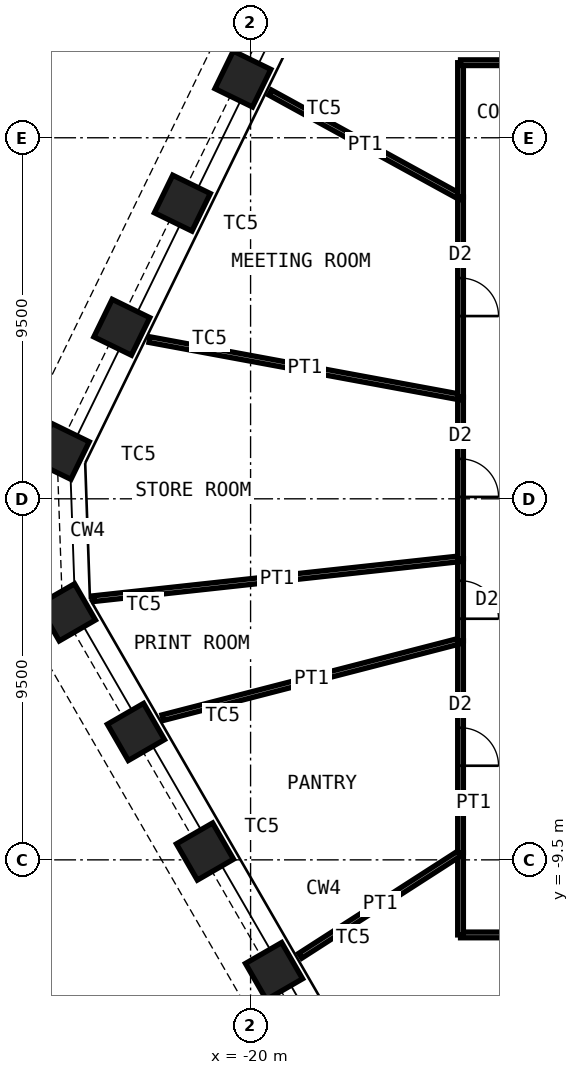
"""IFC4 building model, lengths in metres.
Left out: names, types, materials, properties, quantities, classifications, styles, units other than length and angle.
Written with IfcOpenShell. Run it as: python <this file> out.ifc"""

import sys

from ifc_helpers import new_model, si_unit, direction, frame, frame_2d, origin, origin_2d, place, context, subcontext, project, spatial, rectangle, hollow_rectangle, extrude, element, fill, save


model = new_model("IFC4")
c1 = context("Model", 3, precision=1e-05, world=origin(), true_north=direction((0.0, 1.0)))
c2 = subcontext(c1, "Body", "Model", "MODEL_VIEW")
j1 = project(units=[si_unit("LENGTHUNIT", "METRE"), si_unit("PLANEANGLEUNIT", "RADIAN")], contexts=[c1])
p1 = place(None, origin())
s1 = spatial("IfcSite", under=j1, at=p1, CompositionType="ELEMENT")
p2 = place(p1, origin())
s2 = spatial("IfcBuilding", under=s1, at=p2, CompositionType="ELEMENT")
p3 = place(p2, frame((0.0, 0.0, 218.2)))
s3 = spatial("IfcBuildingStorey", under=s2, at=p3, CompositionType="ELEMENT", Elevation=218.2)
for number, where, z_axis, x_axis in (
    (1, (-19.383, -12.428, 0.0), (0.0, 0.0, 1.0), (0.5, -0.866, 0.0)),
    (2, (-21.2, -9.281, 0.0), (0.0, 0.0, 1.0), (0.5, -0.866, 0.0)),
    (3, (-23.016, -6.134, 0.0), (0.0, 0.0, 1.0), (0.5, -0.866, 0.0)),
    (4, (-24.833, -2.988, 0.0), (0.0, 0.0, 1.0), (0.5, -0.866, 0.0)),
    (5, (-24.981, 1.248, 0.0), (0.0, 0.0, 1.0), (-0.438, -0.899, 0.0)),
    (6, (-23.388, 4.514, 0.0), (0.0, 0.0, 1.0), (-0.438, -0.899, 0.0)),
    (7, (-21.795, 7.78, 0.0), (0.0, 0.0, 1.0), (-0.438, -0.899, 0.0)),
    (8, (-20.203, 11.045, 0.0), (0.0, 0.0, 1.0), (-0.438, -0.899, 0.0)),
):
    element("IfcColumn", number, at=place(p3, frame(where, z_axis=z_axis, x_axis=x_axis)), inside=s3, PredefinedType="COLUMN", context=c2, shape_type="SweptSolid", body=[
        extrude(hollow_rectangle(XDim=1.1, YDim=1.1, WallThickness=0.07, at=origin_2d()), origin(), (0.0, 0.0, 1.0), 4.2),
    ])
p4 = place(p3, frame((0.25, -11.475, 0.0), z_axis=(0.0, 0.0, 1.0), x_axis=(-1.0, 0.0, 0.0)))
e9 = element("IfcWall", 9, at=p4, inside=s3, PredefinedType="PARTITIONING", context=c2, shape_type="SweptSolid", body=[
    extrude(rectangle(XDim=14.725, YDim=0.15, at=frame_2d((7.363, 0.0))), origin(), (0.0, 0.0, 1.0), 4.03),
])
p5 = place(p4, frame((6.463, 0.0, 0.0)))
e10 = element("IfcOpeningElement", 10, at=p5, cuts=e9, PredefinedType="OPENING", context=c2, shape_type="SweptSolid", body=[
    extrude(rectangle(XDim=1.8, YDim=2.4, at=frame_2d((0.9, 1.2))), frame((0.0, 0.085, 0.0), z_axis=(0.0, -1.0, 0.0), x_axis=(1.0, 0.0, 0.0)), (0.0, 0.0, 1.0), 0.17),
])
p6 = place(p3, frame((-14.475, -11.475, 0.0), z_axis=(0.0, 0.0, 1.0), x_axis=(0.0, 1.0, 0.0)))
e11 = element("IfcWall", 11, at=p6, inside=s3, PredefinedType="PARTITIONING", context=c2, shape_type="SweptSolid", body=[
    extrude(rectangle(XDim=2.164, YDim=0.15, at=frame_2d((1.082, 0.0))), origin(), (0.0, 0.0, 1.0), 4.03),
])
p7 = place(p3, frame((-18.693, -12.024, 0.0), z_axis=(0.0, 0.0, 1.0), x_axis=(0.841031335058, 0.540986407824, 0.0)))
e12 = element("IfcWall", 12, at=p7, inside=s3, PredefinedType="PARTITIONING", context=c2, shape_type="SweptSolid", body=[
    extrude(rectangle(XDim=5.015, YDim=0.15, at=frame_2d((2.507, 0.0))), origin(), (0.0, 0.0, 1.0), 3.43),
])
p8 = place(p3, frame((-14.475, -9.311, 0.0), z_axis=(0.0, 0.0, 1.0), x_axis=(0.0, 1.0, 0.0)))
e13 = element("IfcWall", 13, at=p8, inside=s3, PredefinedType="PARTITIONING", context=c2, shape_type="SweptSolid", body=[
    extrude(rectangle(XDim=5.575, YDim=0.15, at=frame_2d((2.787, 0.0))), origin(), (0.0, 0.0, 1.0), 4.03),
])
p9 = place(p8, frame((2.287, 0.0, 0.0)))
e14 = element("IfcOpeningElement", 14, at=p9, cuts=e13, PredefinedType="OPENING", context=c2, shape_type="SweptSolid", body=[
    extrude(rectangle(XDim=1.0, YDim=2.4, at=frame_2d((0.5, 1.2))), frame((0.0, 0.085, 0.0), z_axis=(0.0, -1.0, 0.0), x_axis=(1.0, 0.0, 0.0)), (0.0, 0.0, 1.0), 0.17),
])
p10 = place(p3, frame((-22.313, -5.759, 0.0), z_axis=(0.0, 0.0, 1.0), x_axis=(0.968265788926, 0.249922712042, 0.0)))
e15 = element("IfcWall", 15, at=p10, inside=s3, PredefinedType="PARTITIONING", context=c2, shape_type="SweptSolid", body=[
    extrude(rectangle(XDim=8.095, YDim=0.15, at=frame_2d((4.048, 0.0))), origin(), (0.0, 0.0, 1.0), 3.43),
])
p11 = place(p3, frame((-14.475, -3.736, 0.0), z_axis=(0.0, 0.0, 1.0), x_axis=(0.0, 1.0, 0.0)))
e16 = element("IfcWall", 16, at=p11, inside=s3, PredefinedType="PARTITIONING", context=c2, shape_type="SweptSolid", body=[
    extrude(rectangle(XDim=2.16, YDim=0.15, at=frame_2d((1.08, 0.0))), origin(), (0.0, 0.0, 1.0), 4.03),
])
p12 = place(p11, frame((0.58, 0.0, 0.0)))
e17 = element("IfcOpeningElement", 17, at=p12, cuts=e16, PredefinedType="OPENING", context=c2, shape_type="SweptSolid", body=[
    extrude(rectangle(XDim=1.0, YDim=2.4, at=frame_2d((0.5, 1.2))), frame((0.0, 0.085, 0.0), z_axis=(0.0, -1.0, 0.0), x_axis=(1.0, 0.0, 0.0)), (0.0, 0.0, 1.0), 0.17),
])
p13 = place(p3, frame((-24.128, -2.627, 0.0), z_axis=(0.0, 0.0, 1.0), x_axis=(0.994126892449, 0.108220708326, 0.0)))
e18 = element("IfcWall", 18, at=p13, inside=s3, PredefinedType="PARTITIONING", context=c2, shape_type="SweptSolid", body=[
    extrude(rectangle(XDim=9.71, YDim=0.15, at=frame_2d((4.855, 0.0))), origin(), (0.0, 0.0, 1.0), 2.93),
])
p14 = place(p3, frame((-14.475, -1.576, 0.0), z_axis=(0.0, 0.0, 1.0), x_axis=(0.0, 1.0, 0.0)))
e19 = element("IfcWall", 19, at=p14, inside=s3, PredefinedType="PARTITIONING", context=c2, shape_type="SweptSolid", body=[
    extrude(rectangle(XDim=4.252, YDim=0.15, at=frame_2d((2.126, 0.0))), origin(), (0.0, 0.0, 1.0), 4.03),
])
p15 = place(p14, frame((1.626, 0.0, 0.0)))
e20 = element("IfcOpeningElement", 20, at=p15, cuts=e19, PredefinedType="OPENING", context=c2, shape_type="SweptSolid", body=[
    extrude(rectangle(XDim=1.0, YDim=2.4, at=frame_2d((0.5, 1.2))), frame((0.0, 0.085, 0.0), z_axis=(0.0, -1.0, 0.0), x_axis=(1.0, 0.0, 0.0)), (0.0, 0.0, 1.0), 0.17),
])
p16 = place(p3, frame((-22.661, 4.189, 0.0), z_axis=(0.0, 0.0, 1.0), x_axis=(0.983345347199, -0.181746879316, 0.0)))
e21 = element("IfcWall", 21, at=p16, inside=s3, PredefinedType="PARTITIONING", context=c2, shape_type="SweptSolid", body=[
    extrude(rectangle(XDim=8.324, YDim=0.15, at=frame_2d((4.162, 0.0))), origin(), (0.0, 0.0, 1.0), 3.43),
])
p17 = place(p3, frame((-14.475, 2.676, 0.0), z_axis=(0.0, 0.0, 1.0), x_axis=(0.0, 1.0, 0.0)))
e22 = element("IfcWall", 22, at=p17, inside=s3, PredefinedType="PARTITIONING", context=c2, shape_type="SweptSolid", body=[
    extrude(rectangle(XDim=5.266, YDim=0.15, at=frame_2d((2.633, 0.0))), origin(), (0.0, 0.0, 1.0), 4.03),
])
p18 = place(p17, frame((2.133, 0.0, 0.0)))
e23 = element("IfcOpeningElement", 23, at=p18, cuts=e22, PredefinedType="OPENING", context=c2, shape_type="SweptSolid", body=[
    extrude(rectangle(XDim=1.0, YDim=2.4, at=frame_2d((0.5, 1.2))), frame((0.0, 0.085, 0.0), z_axis=(0.0, -1.0, 0.0), x_axis=(1.0, 0.0, 0.0)), (0.0, 0.0, 1.0), 0.17),
])
p19 = place(p3, frame((-19.486, 10.69, 0.0), z_axis=(0.0, 0.0, 1.0), x_axis=(0.876724089264, -0.480993629172, 0.0)))
e24 = element("IfcWall", 24, at=p19, inside=s3, PredefinedType="PARTITIONING", context=c2, shape_type="SweptSolid", body=[
    extrude(rectangle(XDim=5.715, YDim=0.15, at=frame_2d((2.858, 0.0))), origin(), (0.0, 0.0, 1.0), 3.43),
])
p20 = place(p3, frame((-14.475, 7.941, 0.0), z_axis=(0.0, 0.0, 1.0), x_axis=(0.0, 1.0, 0.0)))
e25 = element("IfcWall", 25, at=p20, inside=s3, PredefinedType="PARTITIONING", context=c2, shape_type="SweptSolid", body=[
    extrude(rectangle(XDim=3.534, YDim=0.15, at=frame_2d((1.767, 0.0))), origin(), (0.0, 0.0, 1.0), 4.03),
])
p21 = place(p3, frame((-14.475, 11.475, 0.0), z_axis=(0.0, 0.0, 1.0), x_axis=(1.0, 0.0, 0.0)))
e26 = element("IfcWall", 26, at=p21, inside=s3, PredefinedType="PARTITIONING", context=c2, shape_type="SweptSolid", body=[
    extrude(rectangle(XDim=6.208, YDim=0.15, at=frame_2d((3.104, 0.0))), origin(), (0.0, 0.0, 1.0), 4.03),
])
p22 = place(p21, frame((2.204, 0.0, 0.0)))
e27 = element("IfcOpeningElement", 27, at=p22, cuts=e26, PredefinedType="OPENING", context=c2, shape_type="SweptSolid", body=[
    extrude(rectangle(XDim=1.8, YDim=2.4, at=frame_2d((0.9, 1.2))), frame((0.0, 0.085, 0.0), z_axis=(0.0, -1.0, 0.0), x_axis=(1.0, 0.0, 0.0)), (0.0, 0.0, 1.0), 0.17),
])
p23 = place(p3, frame((-14.737, 20.455, 0.0), z_axis=(0.0, 0.0, 1.0), x_axis=(0.584547025688, -0.811359830629, 0.0)))
e28 = element("IfcWall", 28, at=p23, inside=s3, PredefinedType="PARTITIONING", context=c2, shape_type="SweptSolid", body=[
    extrude(rectangle(XDim=11.068, YDim=0.15, at=frame_2d((5.534, 0.0))), origin(), (0.0, 0.0, 1.0), 2.93),
])
p24 = place(p9, origin())
e29 = element("IfcDoor", 29, at=p24, inside=s3, OperationType="SINGLE_SWING_LEFT", PredefinedType="DOOR", context=c2, shape_type="SweptSolid", body=[
    extrude(rectangle(XDim=1.0, YDim=2.4, at=frame_2d((0.5, 1.2))), frame((0.0, 0.025, 0.0), z_axis=(0.0, -1.0, 0.0), x_axis=(1.0, 0.0, 0.0)), (0.0, 0.0, 1.0), 0.05),
])
fill(e14, e29)
p25 = place(p12, origin())
e30 = element("IfcDoor", 30, at=p25, inside=s3, OperationType="SINGLE_SWING_LEFT", PredefinedType="DOOR", context=c2, shape_type="SweptSolid", body=[
    extrude(rectangle(XDim=1.0, YDim=2.4, at=frame_2d((0.5, 1.2))), frame((0.0, 0.025, 0.0), z_axis=(0.0, -1.0, 0.0), x_axis=(1.0, 0.0, 0.0)), (0.0, 0.0, 1.0), 0.05),
])
fill(e17, e30)
p26 = place(p15, origin())
e31 = element("IfcDoor", 31, at=p26, inside=s3, OperationType="SINGLE_SWING_LEFT", PredefinedType="DOOR", context=c2, shape_type="SweptSolid", body=[
    extrude(rectangle(XDim=1.0, YDim=2.4, at=frame_2d((0.5, 1.2))), frame((0.0, 0.025, 0.0), z_axis=(0.0, -1.0, 0.0), x_axis=(1.0, 0.0, 0.0)), (0.0, 0.0, 1.0), 0.05),
])
fill(e20, e31)
p27 = place(p18, origin())
e32 = element("IfcDoor", 32, at=p27, inside=s3, OperationType="SINGLE_SWING_LEFT", PredefinedType="DOOR", context=c2, shape_type="SweptSolid", body=[
    extrude(rectangle(XDim=1.0, YDim=2.4, at=frame_2d((0.5, 1.2))), frame((0.0, 0.025, 0.0), z_axis=(0.0, -1.0, 0.0), x_axis=(1.0, 0.0, 0.0)), (0.0, 0.0, 1.0), 0.05),
])
fill(e23, e32)
save(model, sys.argv[1])
